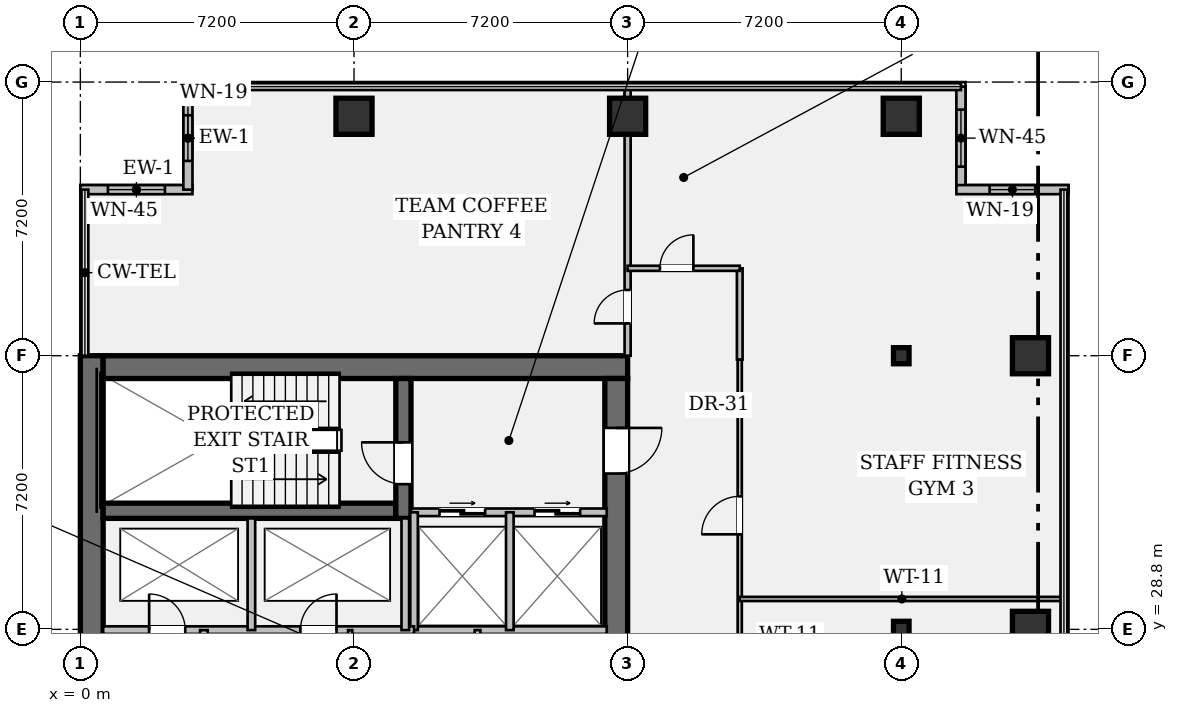
"""IFC4 building model, lengths in metres.
Left out: names, types, materials, properties, quantities, classifications, styles, units other than length and angle.
Written with IfcOpenShell. Run it as: python <this file> out.ifc"""

import sys

from ifc_helpers import new_model, si_unit, direction, frame, frame_2d, origin, origin_2d, place, context, subcontext, project, spatial, rectangle, hollow_rectangle, i_section, extrude, element, fill, save


model = new_model("IFC4")
c1 = context("Model", 3, precision=1e-05, world=origin(), true_north=direction((0.0, 1.0)))
c2 = subcontext(c1, "Body", "Model", "MODEL_VIEW")
j1 = project(units=[si_unit("LENGTHUNIT", "METRE"), si_unit("PLANEANGLEUNIT", "RADIAN")], contexts=[c1])
p1 = place(None, origin())
s1 = spatial("IfcSite", under=j1, at=p1, CompositionType="ELEMENT")
p2 = place(p1, origin())
s2 = spatial("IfcBuilding", under=s1, at=p2, CompositionType="ELEMENT")
p3 = place(p2, frame((0.0, 0.0, 106.05)))
s3 = spatial("IfcBuildingStorey", under=s2, at=p3, CompositionType="ELEMENT", Elevation=106.05)
p4 = place(p3, frame((0.3, 7.2, 0.0), z_axis=(0.0, 0.0, 1.0), x_axis=(0.0, 1.0, 0.0)))
e1 = element("IfcWall", 1, at=p4, inside=s3, PredefinedType="SHEAR", context=c2, shape_type="SweptSolid", body=[
    extrude(rectangle(XDim=28.8, YDim=0.6, at=frame_2d((14.4, 0.0))), origin(), (0.0, 0.0, 1.0), 3.58),
])
p5 = place(p3, frame((0.6, 35.7, 0.0), z_axis=(0.0, 0.0, 1.0), x_axis=(1.0, 0.0, 0.0)))
e2 = element("IfcWall", 2, at=p5, inside=s3, PredefinedType="SHEAR", context=c2, shape_type="SweptSolid", body=[
    extrude(rectangle(XDim=13.8, YDim=0.6, at=frame_2d((6.9, 0.0))), origin(), (0.0, 0.0, 1.0), 3.58),
])
p6 = place(p3, frame((14.1, 35.4, 0.0), z_axis=(0.0, 0.0, 1.0), x_axis=(0.0, -1.0, 0.0)))
e3 = element("IfcWall", 3, at=p6, inside=s3, PredefinedType="SHEAR", context=c2, shape_type="SweptSolid", body=[
    extrude(rectangle(XDim=27.6, YDim=0.6, at=frame_2d((13.8, 0.0))), origin(), (0.0, 0.0, 1.0), 3.58),
])
p7 = place(p6, frame((1.3, 0.0, 0.0)))
e4 = element("IfcOpeningElement", 4, at=p7, cuts=e3, PredefinedType="OPENING", context=c2, shape_type="SweptSolid", body=[
    extrude(rectangle(XDim=1.2, YDim=2.15, at=frame_2d((0.6, 1.075))), frame((0.0, 0.312, 0.0), z_axis=(0.0, -1.0, 0.0), x_axis=(1.0, 0.0, 0.0)), (0.0, 0.0, 1.0), 0.624),
])
p8 = place(p6, frame((25.25, 0.0, 0.0)))
e5 = element("IfcOpeningElement", 5, at=p8, cuts=e3, PredefinedType="OPENING", context=c2, shape_type="SweptSolid", body=[
    extrude(rectangle(XDim=1.2, YDim=2.15, at=frame_2d((0.6, 1.075))), frame((0.0, 0.312, 0.0), z_axis=(0.0, -1.0, 0.0), x_axis=(1.0, 0.0, 0.0)), (0.0, 0.0, 1.0), 0.624),
])
p9 = place(p6, frame((14.6, 0.0, 0.0)))
e6 = element("IfcOpeningElement", 6, at=p9, cuts=e3, PredefinedType="OPENING", context=c2, shape_type="SweptSolid", body=[
    extrude(rectangle(XDim=1.6, YDim=2.2, at=frame_2d((0.8, 1.1))), frame((0.0, 0.312, 0.0), z_axis=(0.0, -1.0, 0.0), x_axis=(1.0, 0.0, 0.0)), (0.0, 0.0, 1.0), 0.624),
])
p10 = place(p3, frame((0.6, 31.92, 0.0), z_axis=(0.0, 0.0, 1.0), x_axis=(1.0, 0.0, 0.0)))
e7 = element("IfcWall", 7, at=p10, inside=s3, PredefinedType="SHEAR", context=c2, shape_type="SweptSolid", body=[
    extrude(rectangle(XDim=7.7, YDim=0.4, at=frame_2d((3.85, 0.0))), origin(), (0.0, 0.0, 1.0), 3.58),
])
p11 = place(p3, frame((8.5, 31.72, 0.0), z_axis=(0.0, 0.0, 1.0), x_axis=(0.0, 1.0, 0.0)))
e8 = element("IfcWall", 8, at=p11, inside=s3, PredefinedType="SHEAR", context=c2, shape_type="SweptSolid", body=[
    extrude(rectangle(XDim=3.68, YDim=0.4, at=frame_2d((1.84, 0.0))), origin(), (0.0, 0.0, 1.0), 3.58),
])
p12 = place(p11, frame((0.9, 0.0, 0.0)))
e9 = element("IfcOpeningElement", 9, at=p12, cuts=e8, PredefinedType="OPENING", context=c2, shape_type="SweptSolid", body=[
    extrude(rectangle(XDim=1.1, YDim=2.15, at=frame_2d((0.55, 1.075))), frame((0.0, 0.212, 0.0), z_axis=(0.0, -1.0, 0.0), x_axis=(1.0, 0.0, 0.0)), (0.0, 0.0, 1.0), 0.424),
])
for number, where, z_axis, x_axis in (
    (10, (7.2, 42.3, 0.0), (0.0, 0.0, 1.0), (1.0, 0.0, 0.0)),
    (11, (14.4, 42.3, 0.0), (0.0, 0.0, 1.0), (1.0, 0.0, 0.0)),
):
    element("IfcColumn", number, at=place(p3, frame(where, z_axis=z_axis, x_axis=x_axis)), inside=s3, PredefinedType="COLUMN", context=c2, shape_type="SweptSolid", body=[
        extrude(hollow_rectangle(XDim=0.95, YDim=0.95, WallThickness=0.06, at=origin_2d()), origin(), (0.0, 0.0, 1.0), 3.58),
    ])
for number, where, z_axis, x_axis in (
    (12, (21.6, 28.8, 0.0), (0.0, 0.0, 1.0), (1.0, 0.0, 0.0)),
    (13, (21.6, 36.0, 0.0), (0.0, 0.0, 1.0), (1.0, 0.0, 0.0)),
):
    element("IfcColumn", number, at=place(p3, frame(where, z_axis=z_axis, x_axis=x_axis)), inside=s3, PredefinedType="COLUMN", context=c2, shape_type="SweptSolid", body=[
        extrude(i_section(OverallWidth=0.409, OverallDepth=0.424, WebThickness=0.033, FlangeThickness=0.052, FilletRadius=0.018, at=origin_2d()), origin(), (0.0, 0.0, 1.0), 3.58),
    ])
for number, where, z_axis, x_axis in (
    (14, (21.6, 42.3, 0.0), (0.0, 0.0, 1.0), (1.0, 0.0, 0.0)),
    (15, (25.0, 28.8, 0.0), (0.0, 0.0, 1.0), (1.0, 0.0, 0.0)),
    (16, (25.0, 36.0, 0.0), (0.0, 0.0, 1.0), (1.0, 0.0, 0.0)),
):
    element("IfcColumn", number, at=place(p3, frame(where, z_axis=z_axis, x_axis=x_axis)), inside=s3, PredefinedType="COLUMN", context=c2, shape_type="SweptSolid", body=[
        extrude(hollow_rectangle(XDim=0.95, YDim=0.95, WallThickness=0.06, at=origin_2d()), origin(), (0.0, 0.0, 1.0), 3.58),
    ])
p13 = place(p3, frame((0.0, 40.37, 0.0), z_axis=(0.0, 0.0, 1.0), x_axis=(1.0, 0.0, 0.0)))
e17 = element("IfcWall", 17, at=p13, inside=s3, PredefinedType="STANDARD", context=c2, shape_type="SweptSolid", body=[
    extrude(rectangle(XDim=2.95, YDim=0.24, at=frame_2d((1.475, 0.0))), origin(), (0.0, 0.0, 1.0), 3.58),
])
p14 = place(p13, frame((0.725, 0.0, 0.95)))
e18 = element("IfcOpeningElement", 18, at=p14, cuts=e17, PredefinedType="OPENING", context=c2, shape_type="SweptSolid", body=[
    extrude(rectangle(XDim=1.5, YDim=1.8, at=frame_2d((0.75, 0.9))), frame((0.0, 0.132, 0.0), z_axis=(0.0, -1.0, 0.0), x_axis=(1.0, 0.0, 0.0)), (0.0, 0.0, 1.0), 0.264),
])
p15 = place(p3, frame((2.83, 40.37, 0.0), z_axis=(0.0, 0.0, 1.0), x_axis=(0.0, 1.0, 0.0)))
e19 = element("IfcWall", 19, at=p15, inside=s3, PredefinedType="STANDARD", context=c2, shape_type="SweptSolid", body=[
    extrude(rectangle(XDim=2.71, YDim=0.24, at=frame_2d((1.355, 0.0))), origin(), (0.0, 0.0, 1.0), 3.58),
])
p16 = place(p15, frame((0.755, 0.0, 0.95)))
e20 = element("IfcOpeningElement", 20, at=p16, cuts=e19, PredefinedType="OPENING", context=c2, shape_type="SweptSolid", body=[
    extrude(rectangle(XDim=1.2, YDim=1.8, at=frame_2d((0.6, 0.9))), frame((0.0, 0.132, 0.0), z_axis=(0.0, -1.0, 0.0), x_axis=(1.0, 0.0, 0.0)), (0.0, 0.0, 1.0), 0.264),
])
p17 = place(p3, frame((23.17, 43.08, 0.0), z_axis=(0.0, 0.0, 1.0), x_axis=(0.0, -1.0, 0.0)))
e21 = element("IfcWall", 21, at=p17, inside=s3, PredefinedType="STANDARD", context=c2, shape_type="SweptSolid", body=[
    extrude(rectangle(XDim=2.71, YDim=0.24, at=frame_2d((1.355, 0.0))), origin(), (0.0, 0.0, 1.0), 3.58),
])
p18 = place(p17, frame((0.605, 0.0, 0.95)))
e22 = element("IfcOpeningElement", 22, at=p18, cuts=e21, PredefinedType="OPENING", context=c2, shape_type="SweptSolid", body=[
    extrude(rectangle(XDim=1.5, YDim=1.8, at=frame_2d((0.75, 0.9))), frame((0.0, 0.132, 0.0), z_axis=(0.0, -1.0, 0.0), x_axis=(1.0, 0.0, 0.0)), (0.0, 0.0, 1.0), 0.264),
])
p19 = place(p3, frame((23.05, 40.37, 0.0), z_axis=(0.0, 0.0, 1.0), x_axis=(1.0, 0.0, 0.0)))
e23 = element("IfcWall", 23, at=p19, inside=s3, PredefinedType="STANDARD", context=c2, shape_type="SweptSolid", body=[
    extrude(rectangle(XDim=2.95, YDim=0.24, at=frame_2d((1.475, 0.0))), origin(), (0.0, 0.0, 1.0), 3.58),
])
p20 = place(p19, frame((0.875, 0.0, 0.95)))
e24 = element("IfcOpeningElement", 24, at=p20, cuts=e23, PredefinedType="OPENING", context=c2, shape_type="SweptSolid", body=[
    extrude(rectangle(XDim=1.2, YDim=1.8, at=frame_2d((0.6, 0.9))), frame((0.0, 0.132, 0.0), z_axis=(0.0, -1.0, 0.0), x_axis=(1.0, 0.0, 0.0)), (0.0, 0.0, 1.0), 0.264),
])
p21 = place(p3, frame((8.7, 31.88, 0.0), z_axis=(0.0, 0.0, 1.0), x_axis=(1.0, 0.0, 0.0)))
e25 = element("IfcWall", 25, at=p21, inside=s3, PredefinedType="PARTITIONING", context=c2, shape_type="SweptSolid", body=[
    extrude(rectangle(XDim=5.15, YDim=0.2, at=frame_2d((2.575, 0.0))), origin(), (0.0, 0.0, 1.0), 3.58),
])
p22 = place(p21, frame((0.75, 0.0, 0.0)))
e26 = element("IfcOpeningElement", 26, at=p22, cuts=e25, PredefinedType="OPENING", context=c2, shape_type="SweptSolid", body=[
    extrude(rectangle(XDim=1.2, YDim=2.2, at=frame_2d((0.6, 1.1))), frame((0.0, 0.112, 0.0), z_axis=(0.0, -1.0, 0.0), x_axis=(1.0, 0.0, 0.0)), (0.0, 0.0, 1.0), 0.224),
])
p23 = place(p21, frame((3.25, 0.0, 0.0)))
e27 = element("IfcOpeningElement", 27, at=p23, cuts=e25, PredefinedType="OPENING", context=c2, shape_type="SweptSolid", body=[
    extrude(rectangle(XDim=1.2, YDim=2.2, at=frame_2d((0.6, 1.1))), frame((0.0, 0.112, 0.0), z_axis=(0.0, -1.0, 0.0), x_axis=(1.0, 0.0, 0.0)), (0.0, 0.0, 1.0), 0.224),
])
p24 = place(p3, frame((8.7, 28.78, 0.0), z_axis=(0.0, 0.0, 1.0), x_axis=(1.0, 0.0, 0.0)))
e28 = element("IfcWall", 28, at=p24, inside=s3, PredefinedType="PARTITIONING", context=c2, shape_type="SweptSolid", body=[
    extrude(rectangle(XDim=5.15, YDim=0.2, at=frame_2d((2.575, 0.0))), origin(), (0.0, 0.0, 1.0), 3.58),
])
for number, where, z_axis, x_axis in (
    (29, (8.78, 28.78, 0.0), (0.0, 0.0, 1.0), (0.0, 1.0, 0.0)),
    (30, (11.3, 28.78, 0.0), (0.0, 0.0, 1.0), (0.0, 1.0, 0.0)),
):
    element("IfcWall", number, at=place(p3, frame(where, z_axis=z_axis, x_axis=x_axis)), inside=s3, PredefinedType="PARTITIONING", context=c2, shape_type="SweptSolid", body=[
        extrude(rectangle(XDim=3.1, YDim=0.2, at=frame_2d((1.55, 0.0))), origin(), (0.0, 0.0, 1.0), 3.58),
    ])
p25 = place(p3, frame((0.6, 28.78, 0.0), z_axis=(0.0, 0.0, 1.0), x_axis=(1.0, 0.0, 0.0)))
e31 = element("IfcWall", 31, at=p25, inside=s3, PredefinedType="PARTITIONING", context=c2, shape_type="SweptSolid", body=[
    extrude(rectangle(XDim=8.18, YDim=0.2, at=frame_2d((4.09, 0.0))), origin(), (0.0, 0.0, 1.0), 3.58),
])
p26 = place(p25, frame((1.21, 0.0, 0.0)))
e32 = element("IfcOpeningElement", 32, at=p26, cuts=e31, PredefinedType="OPENING", context=c2, shape_type="SweptSolid", body=[
    extrude(rectangle(XDim=0.95, YDim=2.15, at=frame_2d((0.475, 1.075))), frame((0.0, 0.112, 0.0), z_axis=(0.0, -1.0, 0.0), x_axis=(1.0, 0.0, 0.0)), (0.0, 0.0, 1.0), 0.224),
])
p27 = place(p25, frame((5.19, 0.0, 0.0)))
e33 = element("IfcOpeningElement", 33, at=p27, cuts=e31, PredefinedType="OPENING", context=c2, shape_type="SweptSolid", body=[
    extrude(rectangle(XDim=0.95, YDim=2.15, at=frame_2d((0.475, 1.075))), frame((0.0, 0.112, 0.0), z_axis=(0.0, -1.0, 0.0), x_axis=(1.0, 0.0, 0.0)), (0.0, 0.0, 1.0), 0.224),
])
for number, where, z_axis, x_axis in (
    (34, (4.5, 28.78, 0.0), (0.0, 0.0, 1.0), (0.0, 1.0, 0.0)),
    (35, (8.55, 28.78, 0.0), (0.0, 0.0, 1.0), (0.0, 1.0, 0.0)),
):
    element("IfcWall", number, at=place(p3, frame(where, z_axis=z_axis, x_axis=x_axis)), inside=s3, PredefinedType="PARTITIONING", context=c2, shape_type="SweptSolid", body=[
        extrude(rectangle(XDim=2.94, YDim=0.2, at=frame_2d((1.47, 0.0))), origin(), (0.0, 0.0, 1.0), 3.58),
    ])
p28 = place(p3, frame((3.25, 15.7, 0.0), z_axis=(0.0, 0.0, 1.0), x_axis=(0.0, 1.0, 0.0)))
e36 = element("IfcWall", 36, at=p28, inside=s3, PredefinedType="PARTITIONING", context=c2, shape_type="SweptSolid", body=[
    extrude(rectangle(XDim=13.08, YDim=0.2, at=frame_2d((6.54, 0.0))), origin(), (0.0, 0.0, 1.0), 3.58),
])
p29 = place(p3, frame((7.1, 22.2, 0.0), z_axis=(0.0, 0.0, 1.0), x_axis=(0.0, 1.0, 0.0)))
e37 = element("IfcWall", 37, at=p29, inside=s3, PredefinedType="PARTITIONING", context=c2, shape_type="SweptSolid", body=[
    extrude(rectangle(XDim=6.58, YDim=0.11, at=frame_2d((3.29, 0.0))), origin(), (0.0, 0.0, 1.0), 3.58),
])
p30 = place(p3, frame((10.45, 22.2, 0.0), z_axis=(0.0, 0.0, 1.0), x_axis=(0.0, 1.0, 0.0)))
e38 = element("IfcWall", 38, at=p30, inside=s3, PredefinedType="PARTITIONING", context=c2, shape_type="SweptSolid", body=[
    extrude(rectangle(XDim=6.58, YDim=0.15, at=frame_2d((3.29, 0.0))), origin(), (0.0, 0.0, 1.0), 3.58),
])
p31 = place(p3, frame((17.35, 20.7, 0.0), z_axis=(0.0, 0.0, 1.0), x_axis=(0.0, 1.0, 0.0)))
e39 = element("IfcWall", 39, at=p31, inside=s3, PredefinedType="PARTITIONING", context=c2, shape_type="SweptSolid", body=[
    extrude(rectangle(XDim=15.2, YDim=0.11, at=frame_2d((7.6, 0.0))), origin(), (0.0, 0.0, 1.0), 2.793),
])
p32 = place(p31, frame((5.2, 0.0, 0.0)))
e40 = element("IfcOpeningElement", 40, at=p32, cuts=e39, PredefinedType="OPENING", context=c2, shape_type="SweptSolid", body=[
    extrude(rectangle(XDim=0.88, YDim=2.15, at=frame_2d((0.44, 1.075))), frame((0.0, 0.067, 0.0), z_axis=(0.0, -1.0, 0.0), x_axis=(1.0, 0.0, 0.0)), (0.0, 0.0, 1.0), 0.134),
])
p33 = place(p31, frame((10.6, 0.0, 0.0)))
e41 = element("IfcOpeningElement", 41, at=p33, cuts=e39, PredefinedType="OPENING", context=c2, shape_type="SweptSolid", body=[
    extrude(rectangle(XDim=1.0, YDim=2.15, at=frame_2d((0.5, 1.075))), frame((0.0, 0.067, 0.0), z_axis=(0.0, -1.0, 0.0), x_axis=(1.0, 0.0, 0.0)), (0.0, 0.0, 1.0), 0.134),
])
p34 = place(p3, frame((17.35, 29.6, 0.0), z_axis=(0.0, 0.0, 1.0), x_axis=(1.0, 0.0, 0.0)))
e42 = element("IfcWall", 42, at=p34, inside=s3, PredefinedType="PARTITIONING", context=c2, shape_type="SweptSolid", body=[
    extrude(rectangle(XDim=8.53, YDim=0.11, at=frame_2d((4.265, 0.0))), origin(), (0.0, 0.0, 1.0), 2.793),
])
p35 = place(p3, frame((14.4, 36.0, 0.0), z_axis=(0.0, 0.0, 1.0), x_axis=(0.0, 1.0, 0.0)))
e43 = element("IfcWall", 43, at=p35, inside=s3, PredefinedType="PARTITIONING", context=c2, shape_type="SweptSolid", body=[
    extrude(rectangle(XDim=7.08, YDim=0.16, at=frame_2d((3.54, 0.0))), origin(), (0.0, 0.0, 1.0), 2.793),
])
p36 = place(p35, frame((0.85, 0.0, 0.0)))
e44 = element("IfcOpeningElement", 44, at=p36, cuts=e43, PredefinedType="OPENING", context=c2, shape_type="SweptSolid", body=[
    extrude(rectangle(XDim=0.88, YDim=2.15, at=frame_2d((0.44, 1.075))), frame((0.0, 0.092, 0.0), z_axis=(0.0, -1.0, 0.0), x_axis=(1.0, 0.0, 0.0)), (0.0, 0.0, 1.0), 0.184),
])
p37 = place(p3, frame((17.35, 35.9, 0.0), z_axis=(0.0, 0.0, 1.0), x_axis=(0.0, 1.0, 0.0)))
e45 = element("IfcWall", 45, at=p37, inside=s3, PredefinedType="PARTITIONING", context=c2, shape_type="SweptSolid", body=[
    extrude(rectangle(XDim=2.4, YDim=0.15, at=frame_2d((1.2, 0.0))), origin(), (0.0, 0.0, 1.0), 2.793),
])
p38 = place(p3, frame((14.4, 38.3, 0.0), z_axis=(0.0, 0.0, 1.0), x_axis=(1.0, 0.0, 0.0)))
e46 = element("IfcWall", 46, at=p38, inside=s3, PredefinedType="PARTITIONING", context=c2, shape_type="SweptSolid", body=[
    extrude(rectangle(XDim=2.95, YDim=0.135, at=frame_2d((1.475, 0.0))), origin(), (0.0, 0.0, 1.0), 2.793),
])
p39 = place(p38, frame((0.85, 0.0, 0.0)))
e47 = element("IfcOpeningElement", 47, at=p39, cuts=e46, PredefinedType="OPENING", context=c2, shape_type="SweptSolid", body=[
    extrude(rectangle(XDim=0.88, YDim=2.15, at=frame_2d((0.44, 1.075))), frame((0.0, 0.08, 0.0), z_axis=(0.0, -1.0, 0.0), x_axis=(1.0, 0.0, 0.0)), (0.0, 0.0, 1.0), 0.159),
])
p40 = place(p14, origin())
e48 = element("IfcWindow", 48, at=p40, inside=s3, PartitioningType="SINGLE_PANEL", PredefinedType="WINDOW", context=c2, shape_type="SweptSolid", body=[
    extrude(rectangle(XDim=1.5, YDim=1.8, at=frame_2d((0.75, 0.9))), frame((0.0, 0.03, 0.0), z_axis=(0.0, -1.0, 0.0), x_axis=(1.0, 0.0, 0.0)), (0.0, 0.0, 1.0), 0.06),
])
fill(e18, e48)
p41 = place(p16, origin())
e49 = element("IfcWindow", 49, at=p41, inside=s3, PartitioningType="SINGLE_PANEL", PredefinedType="WINDOW", context=c2, shape_type="SweptSolid", body=[
    extrude(rectangle(XDim=1.2, YDim=1.8, at=frame_2d((0.6, 0.9))), frame((0.0, 0.03, 0.0), z_axis=(0.0, -1.0, 0.0), x_axis=(1.0, 0.0, 0.0)), (0.0, 0.0, 1.0), 0.06),
])
fill(e20, e49)
p42 = place(p18, origin())
e50 = element("IfcWindow", 50, at=p42, inside=s3, PartitioningType="SINGLE_PANEL", PredefinedType="WINDOW", context=c2, shape_type="SweptSolid", body=[
    extrude(rectangle(XDim=1.5, YDim=1.8, at=frame_2d((0.75, 0.9))), frame((0.0, 0.03, 0.0), z_axis=(0.0, -1.0, 0.0), x_axis=(1.0, 0.0, 0.0)), (0.0, 0.0, 1.0), 0.06),
])
fill(e22, e50)
p43 = place(p20, origin())
e51 = element("IfcWindow", 51, at=p43, inside=s3, PartitioningType="SINGLE_PANEL", PredefinedType="WINDOW", context=c2, shape_type="SweptSolid", body=[
    extrude(rectangle(XDim=1.2, YDim=1.8, at=frame_2d((0.6, 0.9))), frame((0.0, 0.03, 0.0), z_axis=(0.0, -1.0, 0.0), x_axis=(1.0, 0.0, 0.0)), (0.0, 0.0, 1.0), 0.06),
])
fill(e24, e51)
p44 = place(p12, origin())
e52 = element("IfcDoor", 52, at=p44, inside=s3, OperationType="SINGLE_SWING_RIGHT", PredefinedType="DOOR", context=c2, shape_type="SweptSolid", body=[
    extrude(rectangle(XDim=1.1, YDim=2.15, at=frame_2d((0.55, 1.075))), frame((0.0, 0.025, 0.0), z_axis=(0.0, -1.0, 0.0), x_axis=(1.0, 0.0, 0.0)), (0.0, 0.0, 1.0), 0.05),
])
fill(e9, e52)
p45 = place(p7, origin())
e53 = element("IfcDoor", 53, at=p45, inside=s3, OperationType="SINGLE_SWING_LEFT", PredefinedType="DOOR", context=c2, shape_type="SweptSolid", body=[
    extrude(rectangle(XDim=1.2, YDim=2.15, at=frame_2d((0.6, 1.075))), frame((0.0, 0.025, 0.0), z_axis=(0.0, -1.0, 0.0), x_axis=(1.0, 0.0, 0.0)), (0.0, 0.0, 1.0), 0.05),
])
fill(e4, e53)
p46 = place(p22, origin())
e54 = element("IfcDoor", 54, at=p46, inside=s3, OperationType="DOUBLE_DOOR_SLIDING", PredefinedType="DOOR", context=c2, shape_type="SweptSolid", body=[
    extrude(rectangle(XDim=1.2, YDim=2.2, at=frame_2d((0.6, 1.1))), frame((0.0, 0.025, 0.0), z_axis=(0.0, -1.0, 0.0), x_axis=(1.0, 0.0, 0.0)), (0.0, 0.0, 1.0), 0.05),
])
fill(e26, e54)
p47 = place(p23, origin())
e55 = element("IfcDoor", 55, at=p47, inside=s3, OperationType="DOUBLE_DOOR_SLIDING", PredefinedType="DOOR", context=c2, shape_type="SweptSolid", body=[
    extrude(rectangle(XDim=1.2, YDim=2.2, at=frame_2d((0.6, 1.1))), frame((0.0, 0.025, 0.0), z_axis=(0.0, -1.0, 0.0), x_axis=(1.0, 0.0, 0.0)), (0.0, 0.0, 1.0), 0.05),
])
fill(e27, e55)
p48 = place(p26, origin())
e56 = element("IfcDoor", 56, at=p48, inside=s3, OperationType="SINGLE_SWING_LEFT", PredefinedType="DOOR", context=c2, shape_type="SweptSolid", body=[
    extrude(rectangle(XDim=0.95, YDim=2.15, at=frame_2d((0.475, 1.075))), frame((0.0, 0.025, 0.0), z_axis=(0.0, -1.0, 0.0), x_axis=(1.0, 0.0, 0.0)), (0.0, 0.0, 1.0), 0.05),
])
fill(e32, e56)
p49 = place(p27, origin())
e57 = element("IfcDoor", 57, at=p49, inside=s3, OperationType="SINGLE_SWING_RIGHT", PredefinedType="DOOR", context=c2, shape_type="SweptSolid", body=[
    extrude(rectangle(XDim=0.95, YDim=2.15, at=frame_2d((0.475, 1.075))), frame((0.0, 0.025, 0.0), z_axis=(0.0, -1.0, 0.0), x_axis=(1.0, 0.0, 0.0)), (0.0, 0.0, 1.0), 0.05),
])
fill(e33, e57)
p50 = place(p33, origin())
e58 = element("IfcDoor", 58, at=p50, inside=s3, OperationType="SINGLE_SWING_LEFT", PredefinedType="DOOR", context=c2, shape_type="SweptSolid", body=[
    extrude(rectangle(XDim=1.0, YDim=2.15, at=frame_2d((0.5, 1.075))), frame((0.0, 0.025, 0.0), z_axis=(0.0, -1.0, 0.0), x_axis=(1.0, 0.0, 0.0)), (0.0, 0.0, 1.0), 0.05),
])
fill(e41, e58)
p51 = place(p36, origin())
e59 = element("IfcDoor", 59, at=p51, inside=s3, OperationType="SINGLE_SWING_LEFT", PredefinedType="DOOR", context=c2, shape_type="SweptSolid", body=[
    extrude(rectangle(XDim=0.88, YDim=2.15, at=frame_2d((0.44, 1.075))), frame((0.0, 0.025, 0.0), z_axis=(0.0, -1.0, 0.0), x_axis=(1.0, 0.0, 0.0)), (0.0, 0.0, 1.0), 0.05),
])
fill(e44, e59)
p52 = place(p39, origin())
e60 = element("IfcDoor", 60, at=p52, inside=s3, OperationType="SINGLE_SWING_RIGHT", PredefinedType="DOOR", context=c2, shape_type="SweptSolid", body=[
    extrude(rectangle(XDim=0.88, YDim=2.15, at=frame_2d((0.44, 1.075))), frame((0.0, 0.025, 0.0), z_axis=(0.0, -1.0, 0.0), x_axis=(1.0, 0.0, 0.0)), (0.0, 0.0, 1.0), 0.05),
])
fill(e47, e60)
save(model, sys.argv[1])
